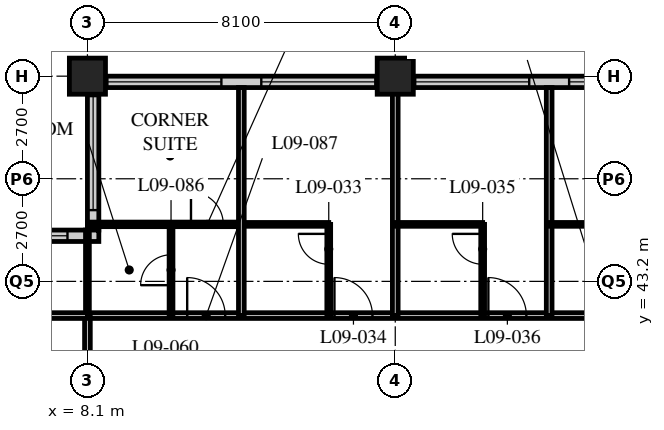
"""IFC4 building model, lengths in metres.
Left out: names, types, materials, properties, quantities, classifications, styles, units other than length and angle.
Written with IfcOpenShell. Run it as: python <this file> out.ifc"""

import sys

from ifc_helpers import new_model, si_unit, direction, frame, frame_2d, origin, origin_2d, place, context, subcontext, project, spatial, rectangle, hollow_rectangle, extrude, element, fill, save


model = new_model("IFC4")
c1 = context("Model", 3, precision=1e-05, world=origin(), true_north=direction((0.0, 1.0)))
c2 = subcontext(c1, "Body", "Model", "MODEL_VIEW")
j1 = project(units=[si_unit("LENGTHUNIT", "METRE"), si_unit("PLANEANGLEUNIT", "RADIAN")], contexts=[c1])
p1 = place(None, origin())
s1 = spatial("IfcSite", under=j1, at=p1, CompositionType="ELEMENT")
p2 = place(p1, origin())
s2 = spatial("IfcBuilding", under=s1, at=p2, CompositionType="ELEMENT")
p3 = place(p2, frame((0.0, 0.0, 43.2)))
s3 = spatial("IfcBuildingStorey", under=s2, at=p3, CompositionType="ELEMENT", Elevation=43.2)
for number, where, z_axis, x_axis in (
    (1, (8.1, 48.6, 0.0), (0.0, 0.0, 1.0), (1.0, 0.0, 0.0)),
    (2, (16.2, 48.6, 0.0), (0.0, 0.0, 1.0), (1.0, 0.0, 0.0)),
):
    element("IfcColumn", number, at=place(p3, frame(where, z_axis=z_axis, x_axis=x_axis)), inside=s3, PredefinedType="COLUMN", context=c2, shape_type="SweptSolid", body=[
        extrude(hollow_rectangle(XDim=0.95, YDim=0.95, WallThickness=0.095, at=origin_2d()), origin(), (0.0, 0.0, 1.0), 3.4),
    ])
p4 = place(p3, frame((48.3, 48.45, 0.0), z_axis=(0.0, 0.0, 1.0), x_axis=(-1.0, 0.0, 0.0)))
e3 = element("IfcWall", 3, at=p4, inside=s3, PredefinedType="SOLIDWALL", context=c2, shape_type="SweptSolid", body=[
    extrude(rectangle(XDim=40.2, YDim=0.3, at=frame_2d((20.1, 0.0))), origin(), (0.0, 0.0, 1.0), 3.19),
])
p5 = place(p4, frame((0.225, 0.0, 0.9)))
e4 = element("IfcOpeningElement", 4, at=p5, cuts=e3, PredefinedType="OPENING", context=c2, shape_type="SweptSolid", body=[
    extrude(rectangle(XDim=3.0, YDim=2.0, at=frame_2d((1.5, 1.0))), frame((0.0, 0.16, 0.0), z_axis=(0.0, -1.0, 0.0), x_axis=(1.0, 0.0, 0.0)), (0.0, 0.0, 1.0), 0.32),
])
p6 = place(p4, frame((4.275, 0.0, 0.9)))
e5 = element("IfcOpeningElement", 5, at=p6, cuts=e3, PredefinedType="OPENING", context=c2, shape_type="SweptSolid", body=[
    extrude(rectangle(XDim=3.0, YDim=2.0, at=frame_2d((1.5, 1.0))), frame((0.0, 0.16, 0.0), z_axis=(0.0, -1.0, 0.0), x_axis=(1.0, 0.0, 0.0)), (0.0, 0.0, 1.0), 0.32),
])
p7 = place(p4, frame((8.325, 0.0, 0.9)))
e6 = element("IfcOpeningElement", 6, at=p7, cuts=e3, PredefinedType="OPENING", context=c2, shape_type="SweptSolid", body=[
    extrude(rectangle(XDim=3.0, YDim=2.0, at=frame_2d((1.5, 1.0))), frame((0.0, 0.16, 0.0), z_axis=(0.0, -1.0, 0.0), x_axis=(1.0, 0.0, 0.0)), (0.0, 0.0, 1.0), 0.32),
])
p8 = place(p4, frame((12.375, 0.0, 0.9)))
e7 = element("IfcOpeningElement", 7, at=p8, cuts=e3, PredefinedType="OPENING", context=c2, shape_type="SweptSolid", body=[
    extrude(rectangle(XDim=3.0, YDim=2.0, at=frame_2d((1.5, 1.0))), frame((0.0, 0.16, 0.0), z_axis=(0.0, -1.0, 0.0), x_axis=(1.0, 0.0, 0.0)), (0.0, 0.0, 1.0), 0.32),
])
p9 = place(p4, frame((16.425, 0.0, 0.9)))
e8 = element("IfcOpeningElement", 8, at=p9, cuts=e3, PredefinedType="OPENING", context=c2, shape_type="SweptSolid", body=[
    extrude(rectangle(XDim=3.0, YDim=2.0, at=frame_2d((1.5, 1.0))), frame((0.0, 0.16, 0.0), z_axis=(0.0, -1.0, 0.0), x_axis=(1.0, 0.0, 0.0)), (0.0, 0.0, 1.0), 0.32),
])
p10 = place(p4, frame((20.475, 0.0, 0.9)))
e9 = element("IfcOpeningElement", 9, at=p10, cuts=e3, PredefinedType="OPENING", context=c2, shape_type="SweptSolid", body=[
    extrude(rectangle(XDim=3.0, YDim=2.0, at=frame_2d((1.5, 1.0))), frame((0.0, 0.16, 0.0), z_axis=(0.0, -1.0, 0.0), x_axis=(1.0, 0.0, 0.0)), (0.0, 0.0, 1.0), 0.32),
])
p11 = place(p4, frame((24.525, 0.0, 0.9)))
e10 = element("IfcOpeningElement", 10, at=p11, cuts=e3, PredefinedType="OPENING", context=c2, shape_type="SweptSolid", body=[
    extrude(rectangle(XDim=3.0, YDim=2.0, at=frame_2d((1.5, 1.0))), frame((0.0, 0.16, 0.0), z_axis=(0.0, -1.0, 0.0), x_axis=(1.0, 0.0, 0.0)), (0.0, 0.0, 1.0), 0.32),
])
p12 = place(p4, frame((28.575, 0.0, 0.9)))
e11 = element("IfcOpeningElement", 11, at=p12, cuts=e3, PredefinedType="OPENING", context=c2, shape_type="SweptSolid", body=[
    extrude(rectangle(XDim=3.0, YDim=2.0, at=frame_2d((1.5, 1.0))), frame((0.0, 0.16, 0.0), z_axis=(0.0, -1.0, 0.0), x_axis=(1.0, 0.0, 0.0)), (0.0, 0.0, 1.0), 0.32),
])
p13 = place(p4, frame((32.625, 0.0, 0.9)))
e12 = element("IfcOpeningElement", 12, at=p13, cuts=e3, PredefinedType="OPENING", context=c2, shape_type="SweptSolid", body=[
    extrude(rectangle(XDim=3.0, YDim=2.0, at=frame_2d((1.5, 1.0))), frame((0.0, 0.16, 0.0), z_axis=(0.0, -1.0, 0.0), x_axis=(1.0, 0.0, 0.0)), (0.0, 0.0, 1.0), 0.32),
])
p14 = place(p4, frame((36.675, 0.0, 0.9)))
e13 = element("IfcOpeningElement", 13, at=p14, cuts=e3, PredefinedType="OPENING", context=c2, shape_type="SweptSolid", body=[
    extrude(rectangle(XDim=3.0, YDim=2.0, at=frame_2d((1.5, 1.0))), frame((0.0, 0.16, 0.0), z_axis=(0.0, -1.0, 0.0), x_axis=(1.0, 0.0, 0.0)), (0.0, 0.0, 1.0), 0.32),
])
p15 = place(p3, frame((8.25, 48.3, 0.0), z_axis=(0.0, 0.0, 1.0), x_axis=(0.0, -1.0, 0.0)))
e14 = element("IfcWall", 14, at=p15, inside=s3, PredefinedType="SOLIDWALL", context=c2, shape_type="SweptSolid", body=[
    extrude(rectangle(XDim=3.75, YDim=0.3, at=frame_2d((1.875, 0.0))), origin(), (0.0, 0.0, 1.0), 3.19),
])
p16 = place(p15, frame((0.225, 0.0, 0.9)))
e15 = element("IfcOpeningElement", 15, at=p16, cuts=e14, PredefinedType="OPENING", context=c2, shape_type="SweptSolid", body=[
    extrude(rectangle(XDim=3.0, YDim=1.5, at=frame_2d((1.5, 0.75))), frame((0.0, 0.16, 0.0), z_axis=(0.0, -1.0, 0.0), x_axis=(1.0, 0.0, 0.0)), (0.0, 0.0, 1.0), 0.32),
])
p17 = place(p3, frame((8.4, 44.4, 0.0), z_axis=(0.0, 0.0, 1.0), x_axis=(-1.0, 0.0, 0.0)))
e16 = element("IfcWall", 16, at=p17, inside=s3, PredefinedType="SOLIDWALL", context=c2, shape_type="SweptSolid", body=[
    extrude(rectangle(XDim=4.35, YDim=0.3, at=frame_2d((2.175, 0.0))), origin(), (0.0, 0.0, 1.0), 3.19),
])
p18 = place(p17, frame((0.825, 0.0, 0.9)))
e17 = element("IfcOpeningElement", 17, at=p18, cuts=e16, PredefinedType="OPENING", context=c2, shape_type="SweptSolid", body=[
    extrude(rectangle(XDim=3.0, YDim=1.5, at=frame_2d((1.5, 0.75))), frame((0.0, 0.16, 0.0), z_axis=(0.0, -1.0, 0.0), x_axis=(1.0, 0.0, 0.0)), (0.0, 0.0, 1.0), 0.32),
])
p19 = place(p3, frame((8.1, 42.3, 0.0), z_axis=(0.0, 0.0, 1.0), x_axis=(1.0, 0.0, 0.0)))
e18 = element("IfcWall", 18, at=p19, inside=s3, PredefinedType="PARTITIONING", context=c2, shape_type="SweptSolid", body=[
    extrude(rectangle(XDim=40.5, YDim=0.15, at=frame_2d((20.25, 0.0))), origin(), (0.0, 0.0, 1.0), 3.19),
])
p20 = place(p19, frame((6.5, 0.0, 0.0)))
e19 = element("IfcOpeningElement", 19, at=p20, cuts=e18, PredefinedType="OPENING", context=c2, shape_type="SweptSolid", body=[
    extrude(rectangle(XDim=1.0, YDim=2.1, at=frame_2d((0.5, 1.05))), frame((0.0, 0.085, 0.0), z_axis=(0.0, -1.0, 0.0), x_axis=(1.0, 0.0, 0.0)), (0.0, 0.0, 1.0), 0.17),
])
p21 = place(p19, frame((10.55, 0.0, 0.0)))
e20 = element("IfcOpeningElement", 20, at=p21, cuts=e18, PredefinedType="OPENING", context=c2, shape_type="SweptSolid", body=[
    extrude(rectangle(XDim=1.0, YDim=2.1, at=frame_2d((0.5, 1.05))), frame((0.0, 0.085, 0.0), z_axis=(0.0, -1.0, 0.0), x_axis=(1.0, 0.0, 0.0)), (0.0, 0.0, 1.0), 0.17),
])
p22 = place(p19, frame((14.6, 0.0, 0.0)))
e21 = element("IfcOpeningElement", 21, at=p22, cuts=e18, PredefinedType="OPENING", context=c2, shape_type="SweptSolid", body=[
    extrude(rectangle(XDim=1.0, YDim=2.1, at=frame_2d((0.5, 1.05))), frame((0.0, 0.085, 0.0), z_axis=(0.0, -1.0, 0.0), x_axis=(1.0, 0.0, 0.0)), (0.0, 0.0, 1.0), 0.17),
])
p23 = place(p19, frame((18.65, 0.0, 0.0)))
e22 = element("IfcOpeningElement", 22, at=p23, cuts=e18, PredefinedType="OPENING", context=c2, shape_type="SweptSolid", body=[
    extrude(rectangle(XDim=1.0, YDim=2.1, at=frame_2d((0.5, 1.05))), frame((0.0, 0.085, 0.0), z_axis=(0.0, -1.0, 0.0), x_axis=(1.0, 0.0, 0.0)), (0.0, 0.0, 1.0), 0.17),
])
p24 = place(p19, frame((22.7, 0.0, 0.0)))
e23 = element("IfcOpeningElement", 23, at=p24, cuts=e18, PredefinedType="OPENING", context=c2, shape_type="SweptSolid", body=[
    extrude(rectangle(XDim=1.0, YDim=2.1, at=frame_2d((0.5, 1.05))), frame((0.0, 0.085, 0.0), z_axis=(0.0, -1.0, 0.0), x_axis=(1.0, 0.0, 0.0)), (0.0, 0.0, 1.0), 0.17),
])
p25 = place(p19, frame((26.75, 0.0, 0.0)))
e24 = element("IfcOpeningElement", 24, at=p25, cuts=e18, PredefinedType="OPENING", context=c2, shape_type="SweptSolid", body=[
    extrude(rectangle(XDim=1.0, YDim=2.1, at=frame_2d((0.5, 1.05))), frame((0.0, 0.085, 0.0), z_axis=(0.0, -1.0, 0.0), x_axis=(1.0, 0.0, 0.0)), (0.0, 0.0, 1.0), 0.17),
])
p26 = place(p19, frame((30.8, 0.0, 0.0)))
e25 = element("IfcOpeningElement", 25, at=p26, cuts=e18, PredefinedType="OPENING", context=c2, shape_type="SweptSolid", body=[
    extrude(rectangle(XDim=1.0, YDim=2.1, at=frame_2d((0.5, 1.05))), frame((0.0, 0.085, 0.0), z_axis=(0.0, -1.0, 0.0), x_axis=(1.0, 0.0, 0.0)), (0.0, 0.0, 1.0), 0.17),
])
p27 = place(p19, frame((34.85, 0.0, 0.0)))
e26 = element("IfcOpeningElement", 26, at=p27, cuts=e18, PredefinedType="OPENING", context=c2, shape_type="SweptSolid", body=[
    extrude(rectangle(XDim=1.0, YDim=2.1, at=frame_2d((0.5, 1.05))), frame((0.0, 0.085, 0.0), z_axis=(0.0, -1.0, 0.0), x_axis=(1.0, 0.0, 0.0)), (0.0, 0.0, 1.0), 0.17),
])
p28 = place(p19, frame((36.875, 0.0, 0.0)))
e27 = element("IfcOpeningElement", 27, at=p28, cuts=e18, PredefinedType="OPENING", context=c2, shape_type="SweptSolid", body=[
    extrude(rectangle(XDim=1.0, YDim=2.1, at=frame_2d((0.5, 1.05))), frame((0.0, 0.085, 0.0), z_axis=(0.0, -1.0, 0.0), x_axis=(1.0, 0.0, 0.0)), (0.0, 0.0, 1.0), 0.17),
])
p29 = place(p19, frame((2.625, 0.0, 0.0)))
e28 = element("IfcOpeningElement", 28, at=p29, cuts=e18, PredefinedType="OPENING", context=c2, shape_type="SweptSolid", body=[
    extrude(rectangle(XDim=1.0, YDim=2.1, at=frame_2d((0.5, 1.05))), frame((0.0, 0.085, 0.0), z_axis=(0.0, -1.0, 0.0), x_axis=(1.0, 0.0, 0.0)), (0.0, 0.0, 1.0), 0.17),
])
p30 = place(p3, frame((8.1, 16.2, 0.0), z_axis=(0.0, 0.0, 1.0), x_axis=(0.0, 1.0, 0.0)))
e29 = element("IfcWall", 29, at=p30, inside=s3, PredefinedType="PARTITIONING", context=c2, shape_type="SweptSolid", body=[
    extrude(rectangle(XDim=26.1, YDim=0.15, at=frame_2d((13.05, 0.0))), origin(), (0.0, 0.0, 1.0), 2.578),
])
p31 = place(p30, frame((2.75, 0.0, 0.0)))
e30 = element("IfcOpeningElement", 30, at=p31, cuts=e29, PredefinedType="OPENING", context=c2, shape_type="SweptSolid", body=[
    extrude(rectangle(XDim=1.0, YDim=2.1, at=frame_2d((0.5, 1.05))), frame((0.0, 0.085, 0.0), z_axis=(0.0, -1.0, 0.0), x_axis=(1.0, 0.0, 0.0)), (0.0, 0.0, 1.0), 0.17),
])
p32 = place(p30, frame((4.35, 0.0, 0.0)))
e31 = element("IfcOpeningElement", 31, at=p32, cuts=e29, PredefinedType="OPENING", context=c2, shape_type="SweptSolid", body=[
    extrude(rectangle(XDim=1.0, YDim=2.1, at=frame_2d((0.5, 1.05))), frame((0.0, 0.085, 0.0), z_axis=(0.0, -1.0, 0.0), x_axis=(1.0, 0.0, 0.0)), (0.0, 0.0, 1.0), 0.17),
])
p33 = place(p30, frame((10.85, 0.0, 0.0)))
e32 = element("IfcOpeningElement", 32, at=p33, cuts=e29, PredefinedType="OPENING", context=c2, shape_type="SweptSolid", body=[
    extrude(rectangle(XDim=1.0, YDim=2.1, at=frame_2d((0.5, 1.05))), frame((0.0, 0.085, 0.0), z_axis=(0.0, -1.0, 0.0), x_axis=(1.0, 0.0, 0.0)), (0.0, 0.0, 1.0), 0.17),
])
p34 = place(p30, frame((12.45, 0.0, 0.0)))
e33 = element("IfcOpeningElement", 33, at=p34, cuts=e29, PredefinedType="OPENING", context=c2, shape_type="SweptSolid", body=[
    extrude(rectangle(XDim=1.0, YDim=2.1, at=frame_2d((0.5, 1.05))), frame((0.0, 0.085, 0.0), z_axis=(0.0, -1.0, 0.0), x_axis=(1.0, 0.0, 0.0)), (0.0, 0.0, 1.0), 0.17),
])
p35 = place(p30, frame((18.65, 0.0, 0.0)))
e34 = element("IfcOpeningElement", 34, at=p35, cuts=e29, PredefinedType="OPENING", context=c2, shape_type="SweptSolid", body=[
    extrude(rectangle(XDim=1.0, YDim=2.1, at=frame_2d((0.5, 1.05))), frame((0.0, 0.085, 0.0), z_axis=(0.0, -1.0, 0.0), x_axis=(1.0, 0.0, 0.0)), (0.0, 0.0, 1.0), 0.17),
])
p36 = place(p30, frame((22.7, 0.0, 0.0)))
e35 = element("IfcOpeningElement", 35, at=p36, cuts=e29, PredefinedType="OPENING", context=c2, shape_type="SweptSolid", body=[
    extrude(rectangle(XDim=1.0, YDim=2.1, at=frame_2d((0.5, 1.05))), frame((0.0, 0.085, 0.0), z_axis=(0.0, -1.0, 0.0), x_axis=(1.0, 0.0, 0.0)), (0.0, 0.0, 1.0), 0.17),
])
p37 = place(p3, frame((12.15, 44.7, 0.0), z_axis=(0.0, 0.0, 1.0), x_axis=(1.0, 0.0, 0.0)))
e36 = element("IfcWall", 36, at=p37, inside=s3, PredefinedType="PARTITIONING", context=c2, shape_type="SweptSolid", body=[
    extrude(rectangle(XDim=2.3, YDim=0.1, at=frame_2d((1.15, 0.0))), origin(), (0.0, 0.0, 1.0), 3.19),
])
p38 = place(p3, frame((14.45, 42.3, 0.0), z_axis=(0.0, 0.0, 1.0), x_axis=(0.0, 1.0, 0.0)))
e37 = element("IfcWall", 37, at=p38, inside=s3, PredefinedType="PARTITIONING", context=c2, shape_type="SweptSolid", body=[
    extrude(rectangle(XDim=2.4, YDim=0.1, at=frame_2d((1.2, 0.0))), origin(), (0.0, 0.0, 1.0), 3.19),
])
p39 = place(p38, frame((1.35, 0.0, 0.0)))
e38 = element("IfcOpeningElement", 38, at=p39, cuts=e37, PredefinedType="OPENING", context=c2, shape_type="SweptSolid", body=[
    extrude(rectangle(XDim=0.8, YDim=2.1, at=frame_2d((0.4, 1.05))), frame((0.0, 0.06, 0.0), z_axis=(0.0, -1.0, 0.0), x_axis=(1.0, 0.0, 0.0)), (0.0, 0.0, 1.0), 0.12),
])
p40 = place(p3, frame((16.2, 42.3, 0.0), z_axis=(0.0, 0.0, 1.0), x_axis=(0.0, 1.0, 0.0)))
e39 = element("IfcWall", 39, at=p40, inside=s3, PredefinedType="PARTITIONING", context=c2, shape_type="SweptSolid", body=[
    extrude(rectangle(XDim=6.0, YDim=0.15, at=frame_2d((3.0, 0.0))), origin(), (0.0, 0.0, 1.0), 2.578),
])
p41 = place(p3, frame((16.2, 44.7, 0.0), z_axis=(0.0, 0.0, 1.0), x_axis=(1.0, 0.0, 0.0)))
e40 = element("IfcWall", 40, at=p41, inside=s3, PredefinedType="PARTITIONING", context=c2, shape_type="SweptSolid", body=[
    extrude(rectangle(XDim=2.3, YDim=0.1, at=frame_2d((1.15, 0.0))), origin(), (0.0, 0.0, 1.0), 3.19),
])
p42 = place(p3, frame((18.5, 42.3, 0.0), z_axis=(0.0, 0.0, 1.0), x_axis=(0.0, 1.0, 0.0)))
e41 = element("IfcWall", 41, at=p42, inside=s3, PredefinedType="PARTITIONING", context=c2, shape_type="SweptSolid", body=[
    extrude(rectangle(XDim=2.4, YDim=0.1, at=frame_2d((1.2, 0.0))), origin(), (0.0, 0.0, 1.0), 3.19),
])
p43 = place(p42, frame((1.35, 0.0, 0.0)))
e42 = element("IfcOpeningElement", 42, at=p43, cuts=e41, PredefinedType="OPENING", context=c2, shape_type="SweptSolid", body=[
    extrude(rectangle(XDim=0.8, YDim=2.1, at=frame_2d((0.4, 1.05))), frame((0.0, 0.06, 0.0), z_axis=(0.0, -1.0, 0.0), x_axis=(1.0, 0.0, 0.0)), (0.0, 0.0, 1.0), 0.12),
])
p44 = place(p3, frame((20.25, 42.3, 0.0), z_axis=(0.0, 0.0, 1.0), x_axis=(0.0, 1.0, 0.0)))
e43 = element("IfcWall", 43, at=p44, inside=s3, PredefinedType="PARTITIONING", context=c2, shape_type="SweptSolid", body=[
    extrude(rectangle(XDim=6.0, YDim=0.15, at=frame_2d((3.0, 0.0))), origin(), (0.0, 0.0, 1.0), 3.19),
])
p45 = place(p3, frame((20.25, 44.7, 0.0), z_axis=(0.0, 0.0, 1.0), x_axis=(1.0, 0.0, 0.0)))
e44 = element("IfcWall", 44, at=p45, inside=s3, PredefinedType="PARTITIONING", context=c2, shape_type="SweptSolid", body=[
    extrude(rectangle(XDim=2.3, YDim=0.1, at=frame_2d((1.15, 0.0))), origin(), (0.0, 0.0, 1.0), 3.19),
])
p46 = place(p3, frame((8.1, 44.7, 0.0), z_axis=(0.0, 0.0, 1.0), x_axis=(1.0, 0.0, 0.0)))
e45 = element("IfcWall", 45, at=p46, inside=s3, PredefinedType="PARTITIONING", context=c2, shape_type="SweptSolid", body=[
    extrude(rectangle(XDim=4.05, YDim=0.12, at=frame_2d((2.025, 0.0))), origin(), (0.0, 0.0, 1.0), 3.19),
])
p47 = place(p46, frame((2.725, 0.0, 0.0)))
e46 = element("IfcOpeningElement", 46, at=p47, cuts=e45, PredefinedType="OPENING", context=c2, shape_type="SweptSolid", body=[
    extrude(rectangle(XDim=0.85, YDim=2.1, at=frame_2d((0.425, 1.05))), frame((0.0, 0.07, 0.0), z_axis=(0.0, -1.0, 0.0), x_axis=(1.0, 0.0, 0.0)), (0.0, 0.0, 1.0), 0.14),
])
p48 = place(p3, frame((10.3, 42.3, 0.0), z_axis=(0.0, 0.0, 1.0), x_axis=(0.0, 1.0, 0.0)))
e47 = element("IfcWall", 47, at=p48, inside=s3, PredefinedType="PARTITIONING", context=c2, shape_type="SweptSolid", body=[
    extrude(rectangle(XDim=2.4, YDim=0.1, at=frame_2d((1.2, 0.0))), origin(), (0.0, 0.0, 1.0), 3.19),
])
p49 = place(p48, frame((0.8, 0.0, 0.0)))
e48 = element("IfcOpeningElement", 48, at=p49, cuts=e47, PredefinedType="OPENING", context=c2, shape_type="SweptSolid", body=[
    extrude(rectangle(XDim=0.8, YDim=2.1, at=frame_2d((0.4, 1.05))), frame((0.0, 0.06, 0.0), z_axis=(0.0, -1.0, 0.0), x_axis=(1.0, 0.0, 0.0)), (0.0, 0.0, 1.0), 0.12),
])
p50 = place(p3, frame((8.1, 42.3, 0.0), z_axis=(0.0, 0.0, 1.0), x_axis=(0.0, 1.0, 0.0)))
e49 = element("IfcWall", 49, at=p50, inside=s3, PredefinedType="PARTITIONING", context=c2, shape_type="SweptSolid", body=[
    extrude(rectangle(XDim=2.25, YDim=0.1, at=frame_2d((1.125, 0.0))), origin(), (0.0, 0.0, 1.0), 2.578),
])
p51 = place(p3, frame((4.35, 42.3, 0.0), z_axis=(0.0, 0.0, 1.0), x_axis=(1.0, 0.0, 0.0)))
e50 = element("IfcWall", 50, at=p51, inside=s3, PredefinedType="PARTITIONING", context=c2, shape_type="SweptSolid", body=[
    extrude(rectangle(XDim=3.75, YDim=0.15, at=frame_2d((1.875, 0.0))), origin(), (0.0, 0.0, 1.0), 3.19),
])
p52 = place(p3, frame((12.15, 42.3, 0.0), z_axis=(0.0, 0.0, 1.0), x_axis=(0.0, 1.0, 0.0)))
e51 = element("IfcWall", 51, at=p52, inside=s3, PredefinedType="PARTITIONING", context=c2, shape_type="SweptSolid", body=[
    extrude(rectangle(XDim=6.0, YDim=0.15, at=frame_2d((3.0, 0.0))), origin(), (0.0, 0.0, 1.0), 3.19),
])
p53 = place(p11, origin())
e52 = element("IfcWindow", 52, at=p53, inside=s3, PartitioningType="SINGLE_PANEL", PredefinedType="WINDOW", context=c2, shape_type="SweptSolid", body=[
    extrude(rectangle(XDim=3.0, YDim=2.0, at=frame_2d((1.5, 1.0))), frame((0.0, 0.03, 0.0), z_axis=(0.0, -1.0, 0.0), x_axis=(1.0, 0.0, 0.0)), (0.0, 0.0, 1.0), 0.06),
])
fill(e10, e52)
p54 = place(p12, origin())
e53 = element("IfcWindow", 53, at=p54, inside=s3, PartitioningType="SINGLE_PANEL", PredefinedType="WINDOW", context=c2, shape_type="SweptSolid", body=[
    extrude(rectangle(XDim=3.0, YDim=2.0, at=frame_2d((1.5, 1.0))), frame((0.0, 0.03, 0.0), z_axis=(0.0, -1.0, 0.0), x_axis=(1.0, 0.0, 0.0)), (0.0, 0.0, 1.0), 0.06),
])
fill(e11, e53)
p55 = place(p13, origin())
e54 = element("IfcWindow", 54, at=p55, inside=s3, PartitioningType="SINGLE_PANEL", PredefinedType="WINDOW", context=c2, shape_type="SweptSolid", body=[
    extrude(rectangle(XDim=3.0, YDim=2.0, at=frame_2d((1.5, 1.0))), frame((0.0, 0.03, 0.0), z_axis=(0.0, -1.0, 0.0), x_axis=(1.0, 0.0, 0.0)), (0.0, 0.0, 1.0), 0.06),
])
fill(e12, e54)
p56 = place(p14, origin())
e55 = element("IfcWindow", 55, at=p56, inside=s3, PartitioningType="SINGLE_PANEL", PredefinedType="WINDOW", context=c2, shape_type="SweptSolid", body=[
    extrude(rectangle(XDim=3.0, YDim=2.0, at=frame_2d((1.5, 1.0))), frame((0.0, 0.03, 0.0), z_axis=(0.0, -1.0, 0.0), x_axis=(1.0, 0.0, 0.0)), (0.0, 0.0, 1.0), 0.06),
])
fill(e13, e55)
p57 = place(p16, origin())
e56 = element("IfcWindow", 56, at=p57, inside=s3, PartitioningType="SINGLE_PANEL", PredefinedType="WINDOW", context=c2, shape_type="SweptSolid", body=[
    extrude(rectangle(XDim=3.0, YDim=1.5, at=frame_2d((1.5, 0.75))), frame((0.0, 0.03, 0.0), z_axis=(0.0, -1.0, 0.0), x_axis=(1.0, 0.0, 0.0)), (0.0, 0.0, 1.0), 0.06),
])
fill(e15, e56)
p58 = place(p18, origin())
e57 = element("IfcWindow", 57, at=p58, inside=s3, PartitioningType="SINGLE_PANEL", PredefinedType="WINDOW", context=c2, shape_type="SweptSolid", body=[
    extrude(rectangle(XDim=3.0, YDim=1.5, at=frame_2d((1.5, 0.75))), frame((0.0, 0.03, 0.0), z_axis=(0.0, -1.0, 0.0), x_axis=(1.0, 0.0, 0.0)), (0.0, 0.0, 1.0), 0.06),
])
fill(e17, e57)
p59 = place(p39, origin())
e58 = element("IfcDoor", 58, at=p59, inside=s3, OperationType="SINGLE_SWING_RIGHT", PredefinedType="DOOR", context=c2, shape_type="SweptSolid", body=[
    extrude(rectangle(XDim=0.8, YDim=2.1, at=frame_2d((0.4, 1.05))), frame((0.0, 0.025, 0.0), z_axis=(0.0, -1.0, 0.0), x_axis=(1.0, 0.0, 0.0)), (0.0, 0.0, 1.0), 0.05),
])
fill(e38, e58)
p60 = place(p20, origin())
e59 = element("IfcDoor", 59, at=p60, inside=s3, OperationType="SINGLE_SWING_LEFT", PredefinedType="DOOR", context=c2, shape_type="SweptSolid", body=[
    extrude(rectangle(XDim=1.0, YDim=2.1, at=frame_2d((0.5, 1.05))), frame((0.0, 0.025, 0.0), z_axis=(0.0, -1.0, 0.0), x_axis=(1.0, 0.0, 0.0)), (0.0, 0.0, 1.0), 0.05),
])
fill(e19, e59)
p61 = place(p43, origin())
e60 = element("IfcDoor", 60, at=p61, inside=s3, OperationType="SINGLE_SWING_RIGHT", PredefinedType="DOOR", context=c2, shape_type="SweptSolid", body=[
    extrude(rectangle(XDim=0.8, YDim=2.1, at=frame_2d((0.4, 1.05))), frame((0.0, 0.025, 0.0), z_axis=(0.0, -1.0, 0.0), x_axis=(1.0, 0.0, 0.0)), (0.0, 0.0, 1.0), 0.05),
])
fill(e42, e60)
p62 = place(p21, origin())
e61 = element("IfcDoor", 61, at=p62, inside=s3, OperationType="SINGLE_SWING_LEFT", PredefinedType="DOOR", context=c2, shape_type="SweptSolid", body=[
    extrude(rectangle(XDim=1.0, YDim=2.1, at=frame_2d((0.5, 1.05))), frame((0.0, 0.025, 0.0), z_axis=(0.0, -1.0, 0.0), x_axis=(1.0, 0.0, 0.0)), (0.0, 0.0, 1.0), 0.05),
])
fill(e20, e61)
p63 = place(p49, origin())
e62 = element("IfcDoor", 62, at=p63, inside=s3, OperationType="SINGLE_SWING_LEFT", PredefinedType="DOOR", context=c2, shape_type="SweptSolid", body=[
    extrude(rectangle(XDim=0.8, YDim=2.1, at=frame_2d((0.4, 1.05))), frame((0.0, 0.025, 0.0), z_axis=(0.0, -1.0, 0.0), x_axis=(1.0, 0.0, 0.0)), (0.0, 0.0, 1.0), 0.05),
])
fill(e48, e62)
p64 = place(p29, origin())
e63 = element("IfcDoor", 63, at=p64, inside=s3, OperationType="SINGLE_SWING_LEFT", PredefinedType="DOOR", context=c2, shape_type="SweptSolid", body=[
    extrude(rectangle(XDim=1.0, YDim=2.1, at=frame_2d((0.5, 1.05))), frame((0.0, 0.025, 0.0), z_axis=(0.0, -1.0, 0.0), x_axis=(1.0, 0.0, 0.0)), (0.0, 0.0, 1.0), 0.05),
])
fill(e28, e63)
p65 = place(p47, origin())
e64 = element("IfcDoor", 64, at=p65, inside=s3, OperationType="SINGLE_SWING_LEFT", PredefinedType="DOOR", context=c2, shape_type="SweptSolid", body=[
    extrude(rectangle(XDim=0.85, YDim=2.1, at=frame_2d((0.425, 1.05))), frame((0.0, 0.025, 0.0), z_axis=(0.0, -1.0, 0.0), x_axis=(1.0, 0.0, 0.0)), (0.0, 0.0, 1.0), 0.05),
])
fill(e46, e64)
save(model, sys.argv[1])
